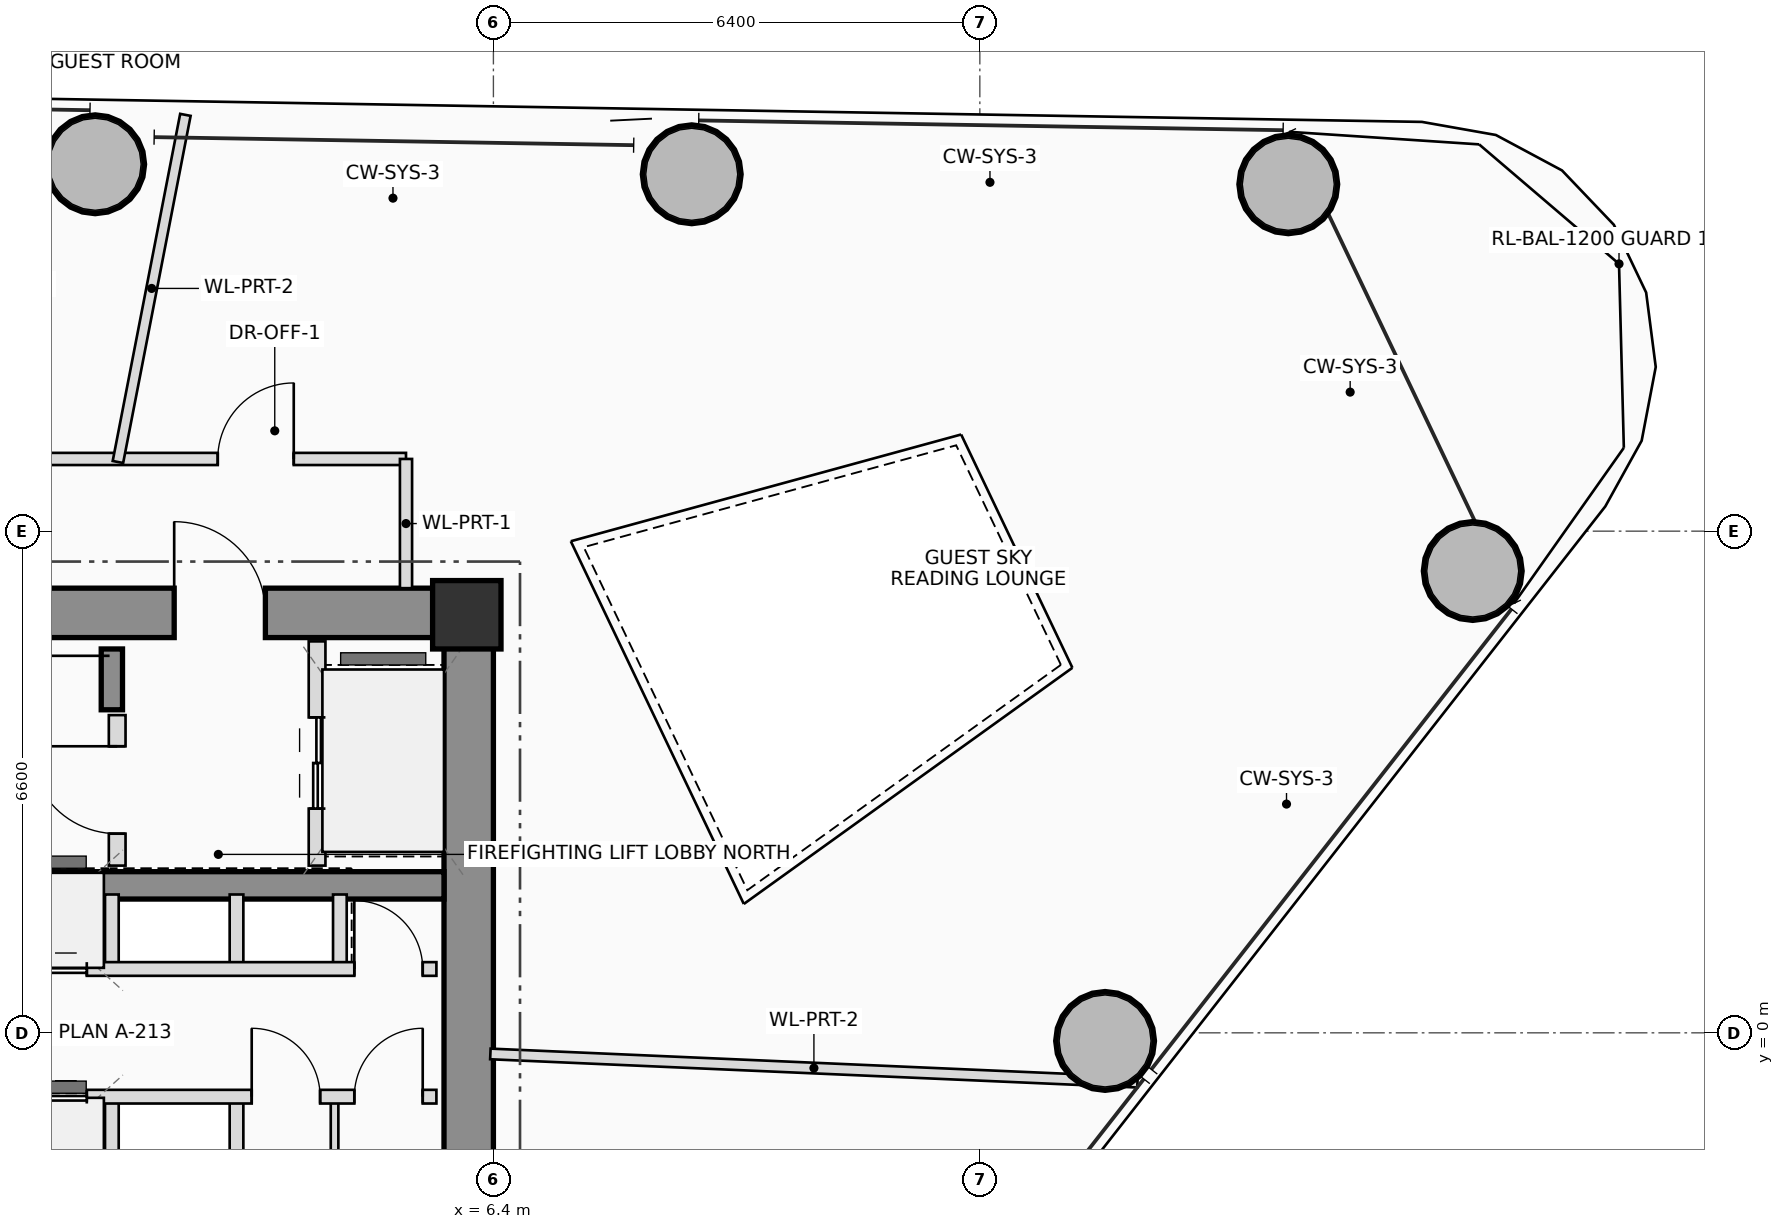
"""IFC4 building model, lengths in metres.
Left out: names, types, materials, properties, quantities, classifications, styles, units other than length and angle.
Written with IfcOpenShell. Run it as: python <this file> out.ifc"""

import sys

from ifc_helpers import new_model, si_unit, direction, frame, frame_2d, origin, origin_2d, place, context, subcontext, project, spatial, rectangle, hollow_circle, extrude, source, transform, mapped, element, fill, save


model = new_model("IFC4")
c1 = context("Model", 3, precision=1e-05, world=origin(), true_north=direction((0.0, 1.0)))
c2 = subcontext(c1, "Body", "Model", "MODEL_VIEW")
j1 = project(units=[si_unit("LENGTHUNIT", "METRE"), si_unit("PLANEANGLEUNIT", "RADIAN")], contexts=[c1])
p1 = place(None, origin())
s1 = spatial("IfcSite", under=j1, at=p1, CompositionType="ELEMENT")
p2 = place(p1, origin())
s2 = spatial("IfcBuilding", under=s1, at=p2, CompositionType="ELEMENT")
p3 = place(p2, frame((0.0, 0.0, 136.4)))
s3 = spatial("IfcBuildingStorey", under=s2, at=p3, CompositionType="ELEMENT", Elevation=136.4)
m1 = source(origin(), c2, "Body", "SweptSolid", [
    extrude(rectangle(XDim=0.9, YDim=0.9, at=origin_2d()), origin(), (0.0, 0.0, 1.0), 3.45),
])
p4 = place(p3, frame((6.05, 5.5, 0.0), z_axis=(0.0, 0.0, 1.0), x_axis=(1.0, 0.0, 0.0)))
e1 = element("IfcColumn", 1, at=p4, inside=s3, PredefinedType="COLUMN", context=c2, shape_type="MappedRepresentation", body=[
    mapped(m1, transform((0.0, 0.0, 0.0), scale=1.0)),
])
p5 = place(p3, frame((-6.4, 5.525, 0.0), z_axis=(0.0, 0.0, 1.0), x_axis=(1.0, 0.0, 0.0)))
e2 = element("IfcWall", 2, at=p5, inside=s3, PredefinedType="SHEAR", context=c2, shape_type="SweptSolid", body=[
    extrude(rectangle(XDim=12.8, YDim=0.65, at=frame_2d((6.4, 0.0))), origin(), (0.0, 0.0, 1.0), 3.45),
])
p6 = place(p5, frame((8.6, 0.0, 0.0)))
e3 = element("IfcOpeningElement", 3, at=p6, cuts=e2, PredefinedType="OPENING", context=c2, shape_type="SweptSolid", body=[
    extrude(rectangle(XDim=1.2, YDim=2.2, at=frame_2d((0.6, 1.1))), frame((0.0, 0.335, 0.0), z_axis=(0.0, -1.0, 0.0), x_axis=(1.0, 0.0, 0.0)), (0.0, 0.0, 1.0), 0.67),
])
p7 = place(p3, frame((6.075, -5.2, 0.0), z_axis=(0.0, 0.0, 1.0), x_axis=(0.0, 1.0, 0.0)))
e4 = element("IfcWall", 4, at=p7, inside=s3, PredefinedType="SHEAR", context=c2, shape_type="SweptSolid", body=[
    extrude(rectangle(XDim=10.4, YDim=0.65, at=frame_2d((5.2, 0.0))), origin(), (0.0, 0.0, 1.0), 3.45),
])
p8 = place(p3, frame((-5.75, 1.94, 0.0), z_axis=(0.0, 0.0, 1.0), x_axis=(1.0, 0.0, 0.0)))
e5 = element("IfcWall", 5, at=p8, inside=s3, PredefinedType="SHEAR", context=c2, shape_type="SweptSolid", body=[
    extrude(rectangle(XDim=11.5, YDim=0.36, at=frame_2d((5.75, 0.0))), origin(), (0.0, 0.0, 1.0), 3.45),
])
p9 = place(p3, frame((1.38, 4.25, 0.0), z_axis=(0.0, 0.0, 1.0), x_axis=(0.0, 1.0, 0.0)))
e6 = element("IfcWall", 6, at=p9, inside=s3, PredefinedType="SHEAR", context=c2, shape_type="SweptSolid", body=[
    extrude(rectangle(XDim=0.8, YDim=0.28, at=frame_2d((0.4, 0.0))), origin(), (0.0, 0.0, 1.0), 3.45),
])
m2 = source(origin(), c2, "Body", "SweptSolid", [
    extrude(hollow_circle(Radius=0.65, WallThickness=0.045, at=origin_2d()), origin(), (0.0, 0.0, 1.0), 3.45),
])
for number, where, z_axis, x_axis in (
    (7, (14.448, -0.107, 0.0), (0.0, 0.0, 1.0), (1.0, 0.0, 0.0)),
    (8, (19.285, 6.076, 0.0), (0.0, 0.0, 1.0), (1.0, 0.0, 0.0)),
    (9, (16.858, 11.164, 0.0), (0.0, 0.0, 1.0), (1.0, 0.0, 0.0)),
    (10, (9.01, 11.295, 0.0), (0.0, 0.0, 1.0), (1.0, 0.0, 0.0)),
    (11, (1.16, 11.427, 0.0), (0.0, 0.0, 1.0), (1.0, 0.0, 0.0)),
):
    element("IfcColumn", number, at=place(p3, frame(where, z_axis=z_axis, x_axis=x_axis)), inside=s3, PredefinedType="COLUMN", context=c2, shape_type="MappedRepresentation", body=[
        mapped(m2, transform((0.0, 0.0, 0.0), scale=1.0)),
    ])
p10 = place(p3, frame((1.45, 2.2, 0.0), z_axis=(0.0, 0.0, 1.0), x_axis=(0.0, 1.0, 0.0)))
e12 = element("IfcWall", 12, at=p10, inside=s3, PredefinedType="PLUMBINGWALL", context=c2, shape_type="SweptSolid", body=[
    extrude(rectangle(XDim=1.98, YDim=0.22, at=frame_2d((0.99, 0.0))), origin(), (0.0, 0.0, 1.0), 3.25),
])
p11 = place(p10, frame((0.42, 0.0, 0.0)))
e13 = element("IfcOpeningElement", 13, at=p11, cuts=e12, PredefinedType="OPENING", context=c2, shape_type="SweptSolid", body=[
    extrude(rectangle(XDim=1.15, YDim=2.15, at=frame_2d((0.575, 1.075))), frame((0.0, 0.12, 0.0), z_axis=(0.0, -1.0, 0.0), x_axis=(1.0, 0.0, 0.0)), (0.0, 0.0, 1.0), 0.24),
])
p12 = place(p3, frame((4.08, 2.2, 0.0), z_axis=(0.0, 0.0, 1.0), x_axis=(0.0, 1.0, 0.0)))
e14 = element("IfcWall", 14, at=p12, inside=s3, PredefinedType="PLUMBINGWALL", context=c2, shape_type="SweptSolid", body=[
    extrude(rectangle(XDim=2.95, YDim=0.22, at=frame_2d((1.475, 0.0))), origin(), (0.0, 0.0, 1.0), 3.25),
])
p13 = place(p12, frame((0.75, 0.0, 0.0)))
e15 = element("IfcOpeningElement", 15, at=p13, cuts=e14, PredefinedType="OPENING", context=c2, shape_type="SweptSolid", body=[
    extrude(rectangle(XDim=1.2, YDim=2.25, at=frame_2d((0.6, 1.125))), frame((0.0, 0.12, 0.0), z_axis=(0.0, -1.0, 0.0), x_axis=(1.0, 0.0, 0.0)), (0.0, 0.0, 1.0), 0.24),
])
for number, where, z_axis, x_axis in (
    (16, (1.38, 0.84, 0.0), (0.0, 0.0, 1.0), (0.0, 1.0, 0.0)),
    (17, (1.38, -1.82, 0.0), (0.0, 0.0, 1.0), (0.0, 1.0, 0.0)),
    (18, (3.02, 0.84, 0.0), (0.0, 0.0, 1.0), (0.0, 1.0, 0.0)),
    (19, (4.38, 0.84, 0.0), (0.0, 0.0, 1.0), (0.0, 1.0, 0.0)),
    (20, (3.02, -1.82, 0.0), (0.0, 0.0, 1.0), (0.0, 1.0, 0.0)),
):
    element("IfcWall", number, at=place(p3, frame(where, z_axis=z_axis, x_axis=x_axis)), inside=s3, PredefinedType="PLUMBINGWALL", context=c2, shape_type="SweptSolid", body=[
        extrude(rectangle(XDim=0.98, YDim=0.18, at=frame_2d((0.49, 0.0))), origin(), (0.0, 0.0, 1.0), 3.25),
    ])
p14 = place(p3, frame((4.31, -1.82, 0.0), z_axis=(0.0, 0.0, 1.0), x_axis=(0.0, 1.0, 0.0)))
e21 = element("IfcWall", 21, at=p14, inside=s3, PredefinedType="PARTITIONING", context=c2, shape_type="SweptSolid", body=[
    extrude(rectangle(XDim=0.98, YDim=0.1, at=frame_2d((0.49, 0.0))), origin(), (0.0, 0.0, 1.0), 3.25),
])
p15 = place(p3, frame((-5.68, 0.84, 0.0), z_axis=(0.0, 0.0, 1.0), x_axis=(1.0, 0.0, 0.0)))
e22 = element("IfcWall", 22, at=p15, inside=s3, PredefinedType="PLUMBINGWALL", context=c2, shape_type="SweptSolid", body=[
    extrude(rectangle(XDim=11.33, YDim=0.18, at=frame_2d((5.665, 0.0))), origin(), (0.0, 0.0, 1.0), 3.25),
])
p16 = place(p15, frame((1.58, 0.0, 0.0)))
e23 = element("IfcOpeningElement", 23, at=p16, cuts=e22, PredefinedType="OPENING", context=c2, shape_type="SweptSolid", body=[
    extrude(rectangle(XDim=0.92, YDim=2.1, at=frame_2d((0.46, 1.05))), frame((0.0, 0.1, 0.0), z_axis=(0.0, -1.0, 0.0), x_axis=(1.0, 0.0, 0.0)), (0.0, 0.0, 1.0), 0.2),
])
p17 = place(p15, frame((3.93, 0.0, 0.0)))
e24 = element("IfcOpeningElement", 24, at=p17, cuts=e22, PredefinedType="OPENING", context=c2, shape_type="SweptSolid", body=[
    extrude(rectangle(XDim=1.1, YDim=2.2, at=frame_2d((0.55, 1.1))), frame((0.0, 0.1, 0.0), z_axis=(0.0, -1.0, 0.0), x_axis=(1.0, 0.0, 0.0)), (0.0, 0.0, 1.0), 0.2),
])
p18 = place(p15, frame((5.63, 0.0, 0.0)))
e25 = element("IfcOpeningElement", 25, at=p18, cuts=e22, PredefinedType="OPENING", context=c2, shape_type="SweptSolid", body=[
    extrude(rectangle(XDim=1.1, YDim=2.2, at=frame_2d((0.55, 1.1))), frame((0.0, 0.1, 0.0), z_axis=(0.0, -1.0, 0.0), x_axis=(1.0, 0.0, 0.0)), (0.0, 0.0, 1.0), 0.2),
])
p19 = place(p15, frame((10.25, 0.0, 0.0)))
e26 = element("IfcOpeningElement", 26, at=p19, cuts=e22, PredefinedType="OPENING", context=c2, shape_type="SweptSolid", body=[
    extrude(rectangle(XDim=0.9, YDim=2.05, at=frame_2d((0.45, 1.025))), frame((0.0, 0.1, 0.0), z_axis=(0.0, -1.0, 0.0), x_axis=(1.0, 0.0, 0.0)), (0.0, 0.0, 1.0), 0.2),
])
p20 = place(p3, frame((-5.68, -0.84, 0.0), z_axis=(0.0, 0.0, 1.0), x_axis=(1.0, 0.0, 0.0)))
e27 = element("IfcWall", 27, at=p20, inside=s3, PredefinedType="PLUMBINGWALL", context=c2, shape_type="SweptSolid", body=[
    extrude(rectangle(XDim=11.33, YDim=0.18, at=frame_2d((5.665, 0.0))), origin(), (0.0, 0.0, 1.0), 3.25),
])
p21 = place(p20, frame((1.18, 0.0, 0.0)))
e28 = element("IfcOpeningElement", 28, at=p21, cuts=e27, PredefinedType="OPENING", context=c2, shape_type="SweptSolid", body=[
    extrude(rectangle(XDim=0.9, YDim=2.05, at=frame_2d((0.45, 1.025))), frame((0.0, 0.1, 0.0), z_axis=(0.0, -1.0, 0.0), x_axis=(1.0, 0.0, 0.0)), (0.0, 0.0, 1.0), 0.2),
])
p22 = place(p20, frame((3.93, 0.0, 0.0)))
e29 = element("IfcOpeningElement", 29, at=p22, cuts=e27, PredefinedType="OPENING", context=c2, shape_type="SweptSolid", body=[
    extrude(rectangle(XDim=1.1, YDim=2.2, at=frame_2d((0.55, 1.1))), frame((0.0, 0.1, 0.0), z_axis=(0.0, -1.0, 0.0), x_axis=(1.0, 0.0, 0.0)), (0.0, 0.0, 1.0), 0.2),
])
p23 = place(p20, frame((5.63, 0.0, 0.0)))
e30 = element("IfcOpeningElement", 30, at=p23, cuts=e27, PredefinedType="OPENING", context=c2, shape_type="SweptSolid", body=[
    extrude(rectangle(XDim=1.1, YDim=2.2, at=frame_2d((0.55, 1.1))), frame((0.0, 0.1, 0.0), z_axis=(0.0, -1.0, 0.0), x_axis=(1.0, 0.0, 0.0)), (0.0, 0.0, 1.0), 0.2),
])
p24 = place(p20, frame((8.9, 0.0, 0.0)))
e31 = element("IfcOpeningElement", 31, at=p24, cuts=e27, PredefinedType="OPENING", context=c2, shape_type="SweptSolid", body=[
    extrude(rectangle(XDim=0.9, YDim=2.05, at=frame_2d((0.45, 1.025))), frame((0.0, 0.1, 0.0), z_axis=(0.0, -1.0, 0.0), x_axis=(1.0, 0.0, 0.0)), (0.0, 0.0, 1.0), 0.2),
])
p25 = place(p20, frame((10.25, 0.0, 0.0)))
e32 = element("IfcOpeningElement", 32, at=p25, cuts=e27, PredefinedType="OPENING", context=c2, shape_type="SweptSolid", body=[
    extrude(rectangle(XDim=0.9, YDim=2.05, at=frame_2d((0.45, 1.025))), frame((0.0, 0.1, 0.0), z_axis=(0.0, -1.0, 0.0), x_axis=(1.0, 0.0, 0.0)), (0.0, 0.0, 1.0), 0.2),
])
p26 = place(p3, frame((-6.36, 7.55, 0.0), z_axis=(0.0, 0.0, 1.0), x_axis=(1.0, 0.0, 0.0)))
e33 = element("IfcWall", 33, at=p26, inside=s3, PredefinedType="PARTITIONING", context=c2, shape_type="SweptSolid", body=[
    extrude(rectangle(XDim=11.61, YDim=0.16, at=frame_2d((5.805, 0.0))), origin(), (0.0, 0.0, 1.0), 2.605),
])
p27 = place(p26, frame((4.33, 0.0, 0.0)))
e34 = element("IfcOpeningElement", 34, at=p27, cuts=e33, PredefinedType="OPENING", context=c2, shape_type="SweptSolid", body=[
    extrude(rectangle(XDim=1.05, YDim=2.2, at=frame_2d((0.525, 1.1))), frame((0.0, 0.09, 0.0), z_axis=(0.0, -1.0, 0.0), x_axis=(1.0, 0.0, 0.0)), (0.0, 0.0, 1.0), 0.18),
])
p28 = place(p26, frame((9.133, 0.0, 0.0)))
e35 = element("IfcOpeningElement", 35, at=p28, cuts=e33, PredefinedType="OPENING", context=c2, shape_type="SweptSolid", body=[
    extrude(rectangle(XDim=1.0, YDim=2.25, at=frame_2d((0.5, 1.125))), frame((0.0, 0.09, 0.0), z_axis=(0.0, -1.0, 0.0), x_axis=(1.0, 0.0, 0.0)), (0.0, 0.0, 1.0), 0.18),
])
p29 = place(p3, frame((5.25, 7.55, 0.0), z_axis=(0.0, 0.0, 1.0), x_axis=(0.0, -1.0, 0.0)))
e36 = element("IfcWall", 36, at=p29, inside=s3, PredefinedType="PARTITIONING", context=c2, shape_type="SweptSolid", body=[
    extrude(rectangle(XDim=1.7, YDim=0.16, at=frame_2d((0.85, 0.0))), origin(), (0.0, 0.0, 1.0), 2.605),
])
p30 = place(p3, frame((6.36, -0.278, 0.0), z_axis=(0.0, 0.0, 1.0), x_axis=(0.999047707238, -0.043631166178, 0.0)))
e37 = element("IfcWall", 37, at=p30, inside=s3, PredefinedType="PARTITIONING", context=c2, shape_type="SweptSolid", body=[
    extrude(rectangle(XDim=8.522, YDim=0.14, at=frame_2d((4.261, 0.0))), origin(), (0.0, 0.0, 1.0), 2.605),
])
p31 = place(p3, frame((1.46, 7.51, 0.0), z_axis=(0.0, 0.0, 1.0), x_axis=(0.19080504805, 0.981627950722, 0.0)))
e38 = element("IfcWall", 38, at=p31, inside=s3, PredefinedType="PARTITIONING", context=c2, shape_type="SweptSolid", body=[
    extrude(rectangle(XDim=4.652, YDim=0.14, at=frame_2d((2.326, 0.0))), origin(), (0.0, 0.0, 1.0), 2.605),
])
p32 = place(p6, origin())
e39 = element("IfcDoor", 39, at=p32, inside=s3, OperationType="SINGLE_SWING_LEFT", PredefinedType="DOOR", context=c2, shape_type="SweptSolid", body=[
    extrude(rectangle(XDim=1.2, YDim=2.2, at=frame_2d((0.6, 1.1))), frame((0.0, 0.025, 0.0), z_axis=(0.0, -1.0, 0.0), x_axis=(1.0, 0.0, 0.0)), (0.0, 0.0, 1.0), 0.05),
])
fill(e3, e39)
p33 = place(p11, origin())
e40 = element("IfcDoor", 40, at=p33, inside=s3, OperationType="SINGLE_SWING_RIGHT", PredefinedType="DOOR", context=c2, shape_type="SweptSolid", body=[
    extrude(rectangle(XDim=1.15, YDim=2.15, at=frame_2d((0.575, 1.075))), frame((0.0, 0.025, 0.0), z_axis=(0.0, -1.0, 0.0), x_axis=(1.0, 0.0, 0.0)), (0.0, 0.0, 1.0), 0.05),
])
fill(e13, e40)
p34 = place(p13, origin())
e41 = element("IfcDoor", 41, at=p34, inside=s3, OperationType="DOUBLE_DOOR_SLIDING", PredefinedType="DOOR", context=c2, shape_type="SweptSolid", body=[
    extrude(rectangle(XDim=1.2, YDim=2.25, at=frame_2d((0.6, 1.125))), frame((0.0, 0.025, 0.0), z_axis=(0.0, -1.0, 0.0), x_axis=(1.0, 0.0, 0.0)), (0.0, 0.0, 1.0), 0.05),
])
fill(e15, e41)
p35 = place(p18, origin())
e42 = element("IfcDoor", 42, at=p35, inside=s3, OperationType="DOUBLE_DOOR_SLIDING", PredefinedType="DOOR", context=c2, shape_type="SweptSolid", body=[
    extrude(rectangle(XDim=1.1, YDim=2.2, at=frame_2d((0.55, 1.1))), frame((0.0, 0.025, 0.0), z_axis=(0.0, -1.0, 0.0), x_axis=(1.0, 0.0, 0.0)), (0.0, 0.0, 1.0), 0.05),
])
fill(e25, e42)
p36 = place(p19, origin())
e43 = element("IfcDoor", 43, at=p36, inside=s3, OperationType="SINGLE_SWING_LEFT", PredefinedType="DOOR", context=c2, shape_type="SweptSolid", body=[
    extrude(rectangle(XDim=0.9, YDim=2.05, at=frame_2d((0.45, 1.025))), frame((0.0, 0.025, 0.0), z_axis=(0.0, -1.0, 0.0), x_axis=(1.0, 0.0, 0.0)), (0.0, 0.0, 1.0), 0.05),
])
fill(e26, e43)
p37 = place(p23, origin())
e44 = element("IfcDoor", 44, at=p37, inside=s3, OperationType="DOUBLE_DOOR_SLIDING", PredefinedType="DOOR", context=c2, shape_type="SweptSolid", body=[
    extrude(rectangle(XDim=1.1, YDim=2.2, at=frame_2d((0.55, 1.1))), frame((0.0, 0.025, 0.0), z_axis=(0.0, -1.0, 0.0), x_axis=(1.0, 0.0, 0.0)), (0.0, 0.0, 1.0), 0.05),
])
fill(e30, e44)
p38 = place(p24, origin())
e45 = element("IfcDoor", 45, at=p38, inside=s3, OperationType="SINGLE_SWING_LEFT", PredefinedType="DOOR", context=c2, shape_type="SweptSolid", body=[
    extrude(rectangle(XDim=0.9, YDim=2.05, at=frame_2d((0.45, 1.025))), frame((0.0, 0.025, 0.0), z_axis=(0.0, -1.0, 0.0), x_axis=(1.0, 0.0, 0.0)), (0.0, 0.0, 1.0), 0.05),
])
fill(e31, e45)
p39 = place(p25, origin())
e46 = element("IfcDoor", 46, at=p39, inside=s3, OperationType="SINGLE_SWING_RIGHT", PredefinedType="DOOR", context=c2, shape_type="SweptSolid", body=[
    extrude(rectangle(XDim=0.9, YDim=2.05, at=frame_2d((0.45, 1.025))), frame((0.0, 0.025, 0.0), z_axis=(0.0, -1.0, 0.0), x_axis=(1.0, 0.0, 0.0)), (0.0, 0.0, 1.0), 0.05),
])
fill(e32, e46)
p40 = place(p28, origin())
e47 = element("IfcDoor", 47, at=p40, inside=s3, OperationType="SINGLE_SWING_RIGHT", PredefinedType="DOOR", context=c2, shape_type="SweptSolid", body=[
    extrude(rectangle(XDim=1.0, YDim=2.25, at=frame_2d((0.5, 1.125))), frame((0.0, 0.025, 0.0), z_axis=(0.0, -1.0, 0.0), x_axis=(1.0, 0.0, 0.0)), (0.0, 0.0, 1.0), 0.05),
])
fill(e35, e47)
save(model, sys.argv[1])
